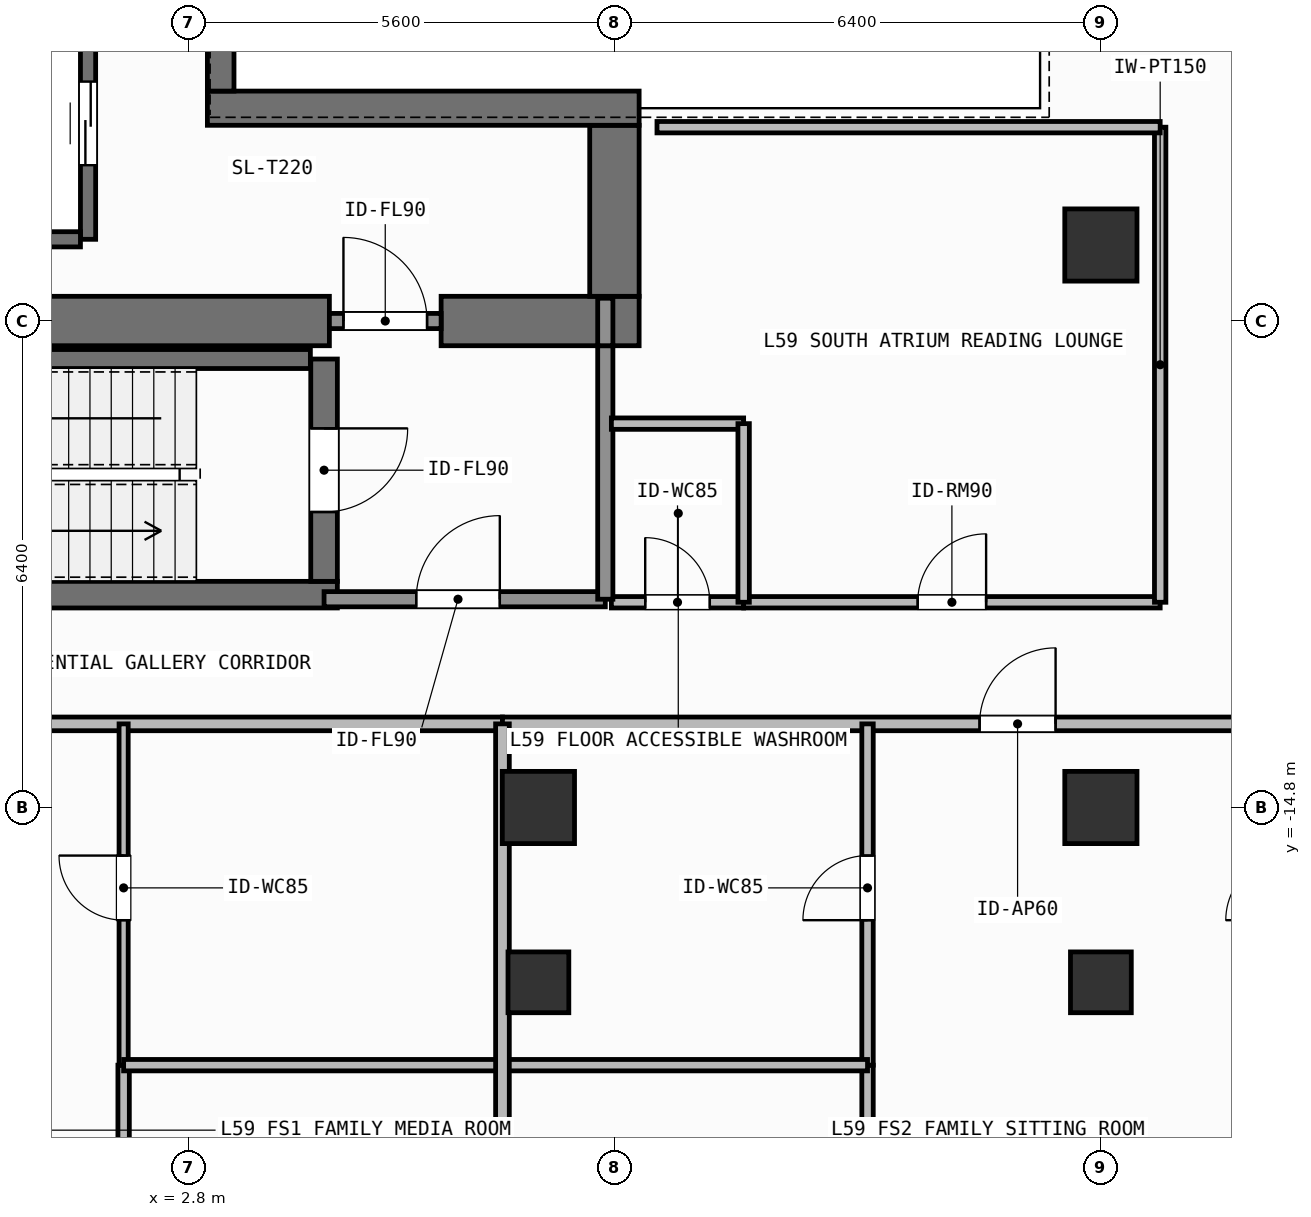
"""IFC4 building model, lengths in metres.
Left out: names, types, materials, properties, quantities, classifications, styles, units other than length and angle.
Written with IfcOpenShell. Run it as: python <this file> out.ifc"""

import sys

from ifc_helpers import new_model, si_unit, direction, frame, frame_2d, origin, origin_2d, place, context, subcontext, project, spatial, rectangle, hollow_rectangle, extrude, element, fill, save


model = new_model("IFC4")
c1 = context("Model", 3, precision=1e-05, world=origin(), true_north=direction((0.0, 1.0)))
c2 = subcontext(c1, "Body", "Model", "MODEL_VIEW")
j1 = project(units=[si_unit("LENGTHUNIT", "METRE"), si_unit("PLANEANGLEUNIT", "RADIAN")], contexts=[c1])
p1 = place(None, origin())
s1 = spatial("IfcSite", under=j1, at=p1, CompositionType="ELEMENT")
p2 = place(p1, origin())
s2 = spatial("IfcBuilding", under=s1, at=p2, CompositionType="ELEMENT")
p3 = place(p2, frame((0.0, 0.0, 243.0)))
s3 = spatial("IfcBuildingStorey", under=s2, at=p3, CompositionType="ELEMENT", Elevation=243.0)
p4 = place(p3, frame((-2.62, -8.4, 0.0), z_axis=(0.0, 0.0, 1.0), x_axis=(1.0, 0.0, 0.0)))
e1 = element("IfcWall", 1, at=p4, inside=s3, PredefinedType="SHEAR", context=c2, shape_type="SweptSolid", body=[
    extrude(rectangle(XDim=7.27, YDim=0.65, at=frame_2d((3.635, 0.0))), origin(), (0.0, 0.0, 1.0), 3.9),
])
p5 = place(p3, frame((6.12, -8.4, 0.0), z_axis=(0.0, 0.0, 1.0), x_axis=(1.0, 0.0, 0.0)))
e2 = element("IfcWall", 2, at=p5, inside=s3, PredefinedType="SHEAR", context=c2, shape_type="SweptSolid", body=[
    extrude(rectangle(XDim=2.605, YDim=0.65, at=frame_2d((1.302, 0.0))), origin(), (0.0, 0.0, 1.0), 3.9),
])
p6 = place(p3, frame((8.4, -8.075, 0.0), z_axis=(0.0, 0.0, 1.0), x_axis=(0.0, 1.0, 0.0)))
e3 = element("IfcWall", 3, at=p6, inside=s3, PredefinedType="SHEAR", context=c2, shape_type="SweptSolid", body=[
    extrude(rectangle(XDim=2.25, YDim=0.65, at=frame_2d((1.125, 0.0))), origin(), (0.0, 0.0, 1.0), 3.9),
])
p7 = place(p3, frame((3.045, -5.6, 0.0), z_axis=(0.0, 0.0, 1.0), x_axis=(1.0, 0.0, 0.0)))
e4 = element("IfcWall", 4, at=p7, inside=s3, PredefinedType="SHEAR", context=c2, shape_type="SweptSolid", body=[
    extrude(rectangle(XDim=5.68, YDim=0.45, at=frame_2d((2.84, 0.0))), origin(), (0.0, 0.0, 1.0), 3.9),
])
p8 = place(p3, frame((3.22, -5.375, 0.0), z_axis=(0.0, 0.0, 1.0), x_axis=(0.0, 1.0, 0.0)))
e5 = element("IfcWall", 5, at=p8, inside=s3, PredefinedType="SHEAR", context=c2, shape_type="SweptSolid", body=[
    extrude(rectangle(XDim=10.75, YDim=0.35, at=frame_2d((5.375, 0.0))), origin(), (0.0, 0.0, 1.0), 3.9),
])
p9 = place(p3, frame((-2.555, -12.0, 0.0), z_axis=(0.0, 0.0, 1.0), x_axis=(1.0, 0.0, 0.0)))
e6 = element("IfcWall", 6, at=p9, inside=s3, PredefinedType="SHEAR", context=c2, shape_type="SweptSolid", body=[
    extrude(rectangle(XDim=7.31, YDim=0.35, at=frame_2d((3.655, 0.0))), origin(), (0.0, 0.0, 1.0), 3.9),
])
p10 = place(p3, frame((-2.2, -8.9, 0.0), z_axis=(0.0, 0.0, 1.0), x_axis=(1.0, 0.0, 0.0)))
e7 = element("IfcWall", 7, at=p10, inside=s3, PredefinedType="SHEAR", context=c2, shape_type="SweptSolid", body=[
    extrude(rectangle(XDim=6.6, YDim=0.25, at=frame_2d((3.3, 0.0))), origin(), (0.0, 0.0, 1.0), 3.9),
])
p11 = place(p3, frame((4.58, -8.9, 0.0), z_axis=(0.0, 0.0, 1.0), x_axis=(0.0, -1.0, 0.0)))
e8 = element("IfcWall", 8, at=p11, inside=s3, PredefinedType="SHEAR", context=c2, shape_type="SweptSolid", body=[
    extrude(rectangle(XDim=2.925, YDim=0.35, at=frame_2d((1.462, 0.0))), origin(), (0.0, 0.0, 1.0), 3.9),
])
p12 = place(p11, frame((0.913, 0.0, 0.0)))
e9 = element("IfcOpeningElement", 9, at=p12, cuts=e8, PredefinedType="OPENING", context=c2, shape_type="SweptSolid", body=[
    extrude(rectangle(XDim=1.1, YDim=2.15, at=frame_2d((0.55, 1.075))), frame((0.0, 0.185, 0.0), z_axis=(0.0, -1.0, 0.0), x_axis=(1.0, 0.0, 0.0)), (0.0, 0.0, 1.0), 0.37),
])
for number, where, z_axis, x_axis in (
    (10, (7.4, -14.8, 0.0), (0.0, 0.0, 1.0), (1.0, 0.0, 0.0)),
    (11, (14.8, -14.8, 0.0), (0.0, 0.0, 1.0), (1.0, 0.0, 0.0)),
    (12, (14.8, -7.4, 0.0), (0.0, 0.0, 1.0), (1.0, 0.0, 0.0)),
):
    element("IfcColumn", number, at=place(p3, frame(where, z_axis=z_axis, x_axis=x_axis)), inside=s3, PredefinedType="COLUMN", context=c2, shape_type="SweptSolid", body=[
        extrude(rectangle(XDim=0.95, YDim=0.95, at=origin_2d()), origin(), (0.0, 0.0, 1.0), 3.9),
    ])
for number, where, z_axis, x_axis in (
    (13, (7.4, -17.1, 0.0), (0.0, 0.0, 1.0), (1.0, 0.0, 0.0)),
    (14, (14.8, -17.1, 0.0), (0.0, 0.0, 1.0), (1.0, 0.0, 0.0)),
):
    element("IfcColumn", number, at=place(p3, frame(where, z_axis=z_axis, x_axis=x_axis)), inside=s3, PredefinedType="COLUMN", context=c2, shape_type="SweptSolid", body=[
        extrude(hollow_rectangle(XDim=0.8, YDim=0.8, WallThickness=0.036, at=origin_2d()), origin(), (0.0, 0.0, 1.0), 3.9),
    ])
p13 = place(p3, frame((1.475, -7.325, 0.0), z_axis=(0.0, 0.0, 1.0), x_axis=(0.0, 1.0, 0.0)))
e15 = element("IfcWall", 15, at=p13, inside=s3, PredefinedType="SHEAR", context=c2, shape_type="SweptSolid", body=[
    extrude(rectangle(XDim=3.05, YDim=0.2, at=frame_2d((1.525, 0.0))), origin(), (0.0, 0.0, 1.0), 3.68),
])
p14 = place(p13, frame((0.975, 0.0, 0.0)))
e16 = element("IfcOpeningElement", 16, at=p14, cuts=e15, PredefinedType="OPENING", context=c2, shape_type="SweptSolid", body=[
    extrude(rectangle(XDim=1.1, YDim=2.2, at=frame_2d((0.55, 1.1))), frame((0.0, 0.11, 0.0), z_axis=(0.0, -1.0, 0.0), x_axis=(1.0, 0.0, 0.0)), (0.0, 0.0, 1.0), 0.22),
])
p15 = place(p3, frame((-0.975, -7.325, 0.0), z_axis=(0.0, 0.0, 1.0), x_axis=(1.0, 0.0, 0.0)))
e17 = element("IfcWall", 17, at=p15, inside=s3, PredefinedType="SHEAR", context=c2, shape_type="SweptSolid", body=[
    extrude(rectangle(XDim=2.35, YDim=0.2, at=frame_2d((1.175, 0.0))), origin(), (0.0, 0.0, 1.0), 3.68),
])
p16 = place(p3, frame((4.58, -12.06, 0.0), z_axis=(0.0, 0.0, 1.0), x_axis=(1.0, 0.0, 0.0)))
e18 = element("IfcWall", 18, at=p16, inside=s3, PredefinedType="SOLIDWALL", context=c2, shape_type="SweptSolid", body=[
    extrude(rectangle(XDim=3.7, YDim=0.2, at=frame_2d((1.85, 0.0))), origin(), (0.0, 0.0, 1.0), 3.68),
])
p17 = place(p16, frame((1.212, 0.0, 0.0)))
e19 = element("IfcOpeningElement", 19, at=p17, cuts=e18, PredefinedType="OPENING", context=c2, shape_type="SweptSolid", body=[
    extrude(rectangle(XDim=1.1, YDim=2.15, at=frame_2d((0.55, 1.075))), frame((0.0, 0.11, 0.0), z_axis=(0.0, -1.0, 0.0), x_axis=(1.0, 0.0, 0.0)), (0.0, 0.0, 1.0), 0.22),
])
p18 = place(p3, frame((4.65, -8.4, 0.0), z_axis=(0.0, 0.0, 1.0), x_axis=(1.0, 0.0, 0.0)))
e20 = element("IfcWall", 20, at=p18, inside=s3, PredefinedType="SOLIDWALL", context=c2, shape_type="SweptSolid", body=[
    extrude(rectangle(XDim=1.47, YDim=0.2, at=frame_2d((0.735, 0.0))), origin(), (0.0, 0.0, 1.0), 2.92),
])
p19 = place(p18, frame((0.185, 0.0, 0.0)))
e21 = element("IfcOpeningElement", 21, at=p19, cuts=e20, PredefinedType="OPENING", context=c2, shape_type="SweptSolid", body=[
    extrude(rectangle(XDim=1.1, YDim=2.15, at=frame_2d((0.55, 1.075))), frame((0.0, 0.11, 0.0), z_axis=(0.0, -1.0, 0.0), x_axis=(1.0, 0.0, 0.0)), (0.0, 0.0, 1.0), 0.22),
])
p20 = place(p3, frame((8.36, -12.1, 0.0), z_axis=(0.0, 0.0, 1.0), x_axis=(1.0, 0.0, 0.0)))
e22 = element("IfcWall", 22, at=p20, inside=s3, PredefinedType="PARTITIONING", context=c2, shape_type="SweptSolid", body=[
    extrude(rectangle(XDim=1.74, YDim=0.15, at=frame_2d((0.87, 0.0))), origin(), (0.0, 0.0, 1.0), 3.68),
])
p21 = place(p20, frame((0.445, 0.0, 0.0)))
e23 = element("IfcOpeningElement", 23, at=p21, cuts=e22, PredefinedType="OPENING", context=c2, shape_type="SweptSolid", body=[
    extrude(rectangle(XDim=0.85, YDim=2.1, at=frame_2d((0.425, 1.05))), frame((0.0, 0.085, 0.0), z_axis=(0.0, -1.0, 0.0), x_axis=(1.0, 0.0, 0.0)), (0.0, 0.0, 1.0), 0.17),
])
p22 = place(p3, frame((10.1, -12.1, 0.0), z_axis=(0.0, 0.0, 1.0), x_axis=(1.0, 0.0, 0.0)))
e24 = element("IfcWall", 24, at=p22, inside=s3, PredefinedType="PARTITIONING", context=c2, shape_type="SweptSolid", body=[
    extrude(rectangle(XDim=5.48, YDim=0.15, at=frame_2d((2.74, 0.0))), origin(), (0.0, 0.0, 1.0), 3.68),
])
p23 = place(p22, frame((2.29, 0.0, 0.0)))
e25 = element("IfcOpeningElement", 25, at=p23, cuts=e24, PredefinedType="OPENING", context=c2, shape_type="SweptSolid", body=[
    extrude(rectangle(XDim=0.9, YDim=2.1, at=frame_2d((0.45, 1.05))), frame((0.0, 0.085, 0.0), z_axis=(0.0, -1.0, 0.0), x_axis=(1.0, 0.0, 0.0)), (0.0, 0.0, 1.0), 0.17),
])
p24 = place(p3, frame((-15.02, -13.7, 0.0), z_axis=(0.0, 0.0, 1.0), x_axis=(1.0, 0.0, 0.0)))
e26 = element("IfcWall", 26, at=p24, inside=s3, PredefinedType="PARTITIONING", context=c2, shape_type="SweptSolid", body=[
    extrude(rectangle(XDim=21.947, YDim=0.18, at=frame_2d((10.974, 0.0))), origin(), (0.0, 0.0, 1.0), 3.68),
])
p25 = place(p24, frame((10.205, 0.0, 0.0)))
e27 = element("IfcOpeningElement", 27, at=p25, cuts=e26, PredefinedType="OPENING", context=c2, shape_type="SweptSolid", body=[
    extrude(rectangle(XDim=1.0, YDim=2.2, at=frame_2d((0.5, 1.1))), frame((0.0, 0.1, 0.0), z_axis=(0.0, -1.0, 0.0), x_axis=(1.0, 0.0, 0.0)), (0.0, 0.0, 1.0), 0.2),
])
p26 = place(p3, frame((1.943, -21.504, 0.0), z_axis=(0.0, 0.0, 1.0), x_axis=(0.0, 1.0, 0.0)))
e28 = element("IfcWall", 28, at=p26, inside=s3, PredefinedType="PARTITIONING", context=c2, shape_type="SweptSolid", body=[
    extrude(rectangle(XDim=3.314, YDim=0.15, at=frame_2d((1.657, 0.0))), origin(), (0.0, 0.0, 1.0), 3.68),
])
p27 = place(p26, frame((1.232, 0.0, 0.0)))
e29 = element("IfcOpeningElement", 29, at=p27, cuts=e28, PredefinedType="OPENING", context=c2, shape_type="SweptSolid", body=[
    extrude(rectangle(XDim=0.85, YDim=2.1, at=frame_2d((0.425, 1.05))), frame((0.0, 0.085, 0.0), z_axis=(0.0, -1.0, 0.0), x_axis=(1.0, 0.0, 0.0)), (0.0, 0.0, 1.0), 0.17),
])
p28 = place(p3, frame((1.943, -18.19, 0.0), z_axis=(0.0, 0.0, 1.0), x_axis=(0.0, 1.0, 0.0)))
e30 = element("IfcWall", 30, at=p28, inside=s3, PredefinedType="PARTITIONING", context=c2, shape_type="SweptSolid", body=[
    extrude(rectangle(XDim=4.49, YDim=0.12, at=frame_2d((2.245, 0.0))), origin(), (0.0, 0.0, 1.0), 3.68),
])
p29 = place(p28, frame((1.907, 0.0, 0.0)))
e31 = element("IfcOpeningElement", 31, at=p29, cuts=e30, PredefinedType="OPENING", context=c2, shape_type="SweptSolid", body=[
    extrude(rectangle(XDim=0.85, YDim=2.1, at=frame_2d((0.425, 1.05))), frame((0.0, 0.07, 0.0), z_axis=(0.0, -1.0, 0.0), x_axis=(1.0, 0.0, 0.0)), (0.0, 0.0, 1.0), 0.14),
])
p30 = place(p3, frame((6.927, -13.7, 0.0), z_axis=(0.0, 0.0, 1.0), x_axis=(1.0, 0.0, 0.0)))
e32 = element("IfcWall", 32, at=p30, inside=s3, PredefinedType="PARTITIONING", context=c2, shape_type="SweptSolid", body=[
    extrude(rectangle(XDim=15.893, YDim=0.18, at=frame_2d((7.947, 0.0))), origin(), (0.0, 0.0, 1.0), 3.68),
])
p31 = place(p30, frame((6.277, 0.0, 0.0)))
e33 = element("IfcOpeningElement", 33, at=p31, cuts=e32, PredefinedType="OPENING", context=c2, shape_type="SweptSolid", body=[
    extrude(rectangle(XDim=1.0, YDim=2.2, at=frame_2d((0.5, 1.1))), frame((0.0, 0.1, 0.0), z_axis=(0.0, -1.0, 0.0), x_axis=(1.0, 0.0, 0.0)), (0.0, 0.0, 1.0), 0.2),
])
p32 = place(p3, frame((11.73, -24.39, 0.0), z_axis=(0.0, 0.0, 1.0), x_axis=(0.0, 1.0, 0.0)))
e34 = element("IfcWall", 34, at=p32, inside=s3, PredefinedType="PARTITIONING", context=c2, shape_type="SweptSolid", body=[
    extrude(rectangle(XDim=6.2, YDim=0.15, at=frame_2d((3.1, 0.0))), origin(), (0.0, 0.0, 1.0), 3.68),
])
p33 = place(p32, frame((2.675, 0.0, 0.0)))
e35 = element("IfcOpeningElement", 35, at=p33, cuts=e34, PredefinedType="OPENING", context=c2, shape_type="SweptSolid", body=[
    extrude(rectangle(XDim=0.85, YDim=2.1, at=frame_2d((0.425, 1.05))), frame((0.0, 0.085, 0.0), z_axis=(0.0, -1.0, 0.0), x_axis=(1.0, 0.0, 0.0)), (0.0, 0.0, 1.0), 0.17),
])
p34 = place(p3, frame((11.73, -18.19, 0.0), z_axis=(0.0, 0.0, 1.0), x_axis=(0.0, 1.0, 0.0)))
e36 = element("IfcWall", 36, at=p34, inside=s3, PredefinedType="PARTITIONING", context=c2, shape_type="SweptSolid", body=[
    extrude(rectangle(XDim=4.49, YDim=0.15, at=frame_2d((2.245, 0.0))), origin(), (0.0, 0.0, 1.0), 3.68),
])
p35 = place(p34, frame((1.907, 0.0, 0.0)))
e37 = element("IfcOpeningElement", 37, at=p35, cuts=e36, PredefinedType="OPENING", context=c2, shape_type="SweptSolid", body=[
    extrude(rectangle(XDim=0.85, YDim=2.1, at=frame_2d((0.425, 1.05))), frame((0.0, 0.085, 0.0), z_axis=(0.0, -1.0, 0.0), x_axis=(1.0, 0.0, 0.0)), (0.0, 0.0, 1.0), 0.17),
])
p36 = place(p3, frame((8.28, -12.06, 0.0), z_axis=(0.0, 0.0, 1.0), x_axis=(0.0, 1.0, 0.0)))
e38 = element("IfcWall", 38, at=p36, inside=s3, PredefinedType="SOLIDWALL", context=c2, shape_type="SweptSolid", body=[
    extrude(rectangle(XDim=3.335, YDim=0.2, at=frame_2d((1.667, 0.0))), origin(), (0.0, 0.0, 1.0), 3.68),
])
p37 = place(p3, frame((8.28, -8.725, 0.0), z_axis=(0.0, 0.0, 1.0), x_axis=(0.0, 1.0, 0.0)))
e39 = element("IfcWall", 39, at=p37, inside=s3, PredefinedType="SOLIDWALL", context=c2, shape_type="SweptSolid", body=[
    extrude(rectangle(XDim=0.625, YDim=0.2, at=frame_2d((0.312, 0.0))), origin(), (0.0, 0.0, 1.0), 3.68),
])
p38 = place(p3, frame((8.36, -9.75, 0.0), z_axis=(0.0, 0.0, 1.0), x_axis=(1.0, 0.0, 0.0)))
e40 = element("IfcWall", 40, at=p38, inside=s3, PredefinedType="PARTITIONING", context=c2, shape_type="SweptSolid", body=[
    extrude(rectangle(XDim=1.74, YDim=0.15, at=frame_2d((0.87, 0.0))), origin(), (0.0, 0.0, 1.0), 3.68),
])
p39 = place(p3, frame((10.1, -12.1, 0.0), z_axis=(0.0, 0.0, 1.0), x_axis=(0.0, 1.0, 0.0)))
e41 = element("IfcWall", 41, at=p39, inside=s3, PredefinedType="PARTITIONING", context=c2, shape_type="SweptSolid", body=[
    extrude(rectangle(XDim=2.35, YDim=0.15, at=frame_2d((1.175, 0.0))), origin(), (0.0, 0.0, 1.0), 3.68),
])
p40 = place(p3, frame((15.58, -12.1, 0.0), z_axis=(0.0, 0.0, 1.0), x_axis=(0.0, 1.0, 0.0)))
e42 = element("IfcWall", 42, at=p40, inside=s3, PredefinedType="PARTITIONING", context=c2, shape_type="SweptSolid", body=[
    extrude(rectangle(XDim=6.25, YDim=0.15, at=frame_2d((3.125, 0.0))), origin(), (0.0, 0.0, 1.0), 3.68),
])
p41 = place(p3, frame((8.96, -5.85, 0.0), z_axis=(0.0, 0.0, 1.0), x_axis=(1.0, 0.0, 0.0)))
e43 = element("IfcWall", 43, at=p41, inside=s3, PredefinedType="PARTITIONING", context=c2, shape_type="SweptSolid", body=[
    extrude(rectangle(XDim=6.62, YDim=0.15, at=frame_2d((3.31, 0.0))), origin(), (0.0, 0.0, 1.0), 3.68),
])
p42 = place(p3, frame((1.943, -18.19, 0.0), z_axis=(0.0, 0.0, 1.0), x_axis=(1.0, 0.0, 0.0)))
e44 = element("IfcWall", 44, at=p42, inside=s3, PredefinedType="PARTITIONING", context=c2, shape_type="SweptSolid", body=[
    extrude(rectangle(XDim=4.984, YDim=0.15, at=frame_2d((2.492, 0.0))), origin(), (0.0, 0.0, 1.0), 3.68),
])
p43 = place(p3, frame((6.927, -18.19, 0.0), z_axis=(0.0, 0.0, 1.0), x_axis=(1.0, 0.0, 0.0)))
e45 = element("IfcWall", 45, at=p43, inside=s3, PredefinedType="PARTITIONING", context=c2, shape_type="SweptSolid", body=[
    extrude(rectangle(XDim=4.803, YDim=0.15, at=frame_2d((2.401, 0.0))), origin(), (0.0, 0.0, 1.0), 3.68),
])
p44 = place(p3, frame((6.927, -28.63, 0.0), z_axis=(0.0, 0.0, 1.0), x_axis=(0.0, 1.0, 0.0)))
e46 = element("IfcWall", 46, at=p44, inside=s3, PredefinedType="PARTITIONING", context=c2, shape_type="SweptSolid", body=[
    extrude(rectangle(XDim=14.93, YDim=0.18, at=frame_2d((7.465, 0.0))), origin(), (0.0, 0.0, 1.0), 3.68),
])
p45 = place(p14, origin())
e47 = element("IfcDoor", 47, at=p45, inside=s3, OperationType="SLIDING_TO_LEFT", PredefinedType="DOOR", context=c2, shape_type="SweptSolid", body=[
    extrude(rectangle(XDim=1.1, YDim=2.2, at=frame_2d((0.55, 1.1))), frame((0.0, 0.025, 0.0), z_axis=(0.0, -1.0, 0.0), x_axis=(1.0, 0.0, 0.0)), (0.0, 0.0, 1.0), 0.05),
])
fill(e16, e47)
p46 = place(p12, origin())
e48 = element("IfcDoor", 48, at=p46, inside=s3, OperationType="SINGLE_SWING_LEFT", PredefinedType="DOOR", context=c2, shape_type="SweptSolid", body=[
    extrude(rectangle(XDim=1.1, YDim=2.15, at=frame_2d((0.55, 1.075))), frame((0.0, 0.025, 0.0), z_axis=(0.0, -1.0, 0.0), x_axis=(1.0, 0.0, 0.0)), (0.0, 0.0, 1.0), 0.05),
])
fill(e9, e48)
p47 = place(p17, origin())
e49 = element("IfcDoor", 49, at=p47, inside=s3, OperationType="SINGLE_SWING_RIGHT", PredefinedType="DOOR", context=c2, shape_type="SweptSolid", body=[
    extrude(rectangle(XDim=1.1, YDim=2.15, at=frame_2d((0.55, 1.075))), frame((0.0, 0.025, 0.0), z_axis=(0.0, -1.0, 0.0), x_axis=(1.0, 0.0, 0.0)), (0.0, 0.0, 1.0), 0.05),
])
fill(e19, e49)
p48 = place(p19, origin())
e50 = element("IfcDoor", 50, at=p48, inside=s3, OperationType="SINGLE_SWING_LEFT", PredefinedType="DOOR", context=c2, shape_type="SweptSolid", body=[
    extrude(rectangle(XDim=1.1, YDim=2.15, at=frame_2d((0.55, 1.075))), frame((0.0, 0.025, 0.0), z_axis=(0.0, -1.0, 0.0), x_axis=(1.0, 0.0, 0.0)), (0.0, 0.0, 1.0), 0.05),
])
fill(e21, e50)
p49 = place(p21, origin())
e51 = element("IfcDoor", 51, at=p49, inside=s3, OperationType="SINGLE_SWING_LEFT", PredefinedType="DOOR", context=c2, shape_type="SweptSolid", body=[
    extrude(rectangle(XDim=0.85, YDim=2.1, at=frame_2d((0.425, 1.05))), frame((0.0, 0.025, 0.0), z_axis=(0.0, -1.0, 0.0), x_axis=(1.0, 0.0, 0.0)), (0.0, 0.0, 1.0), 0.05),
])
fill(e23, e51)
p50 = place(p23, origin())
e52 = element("IfcDoor", 52, at=p50, inside=s3, OperationType="SINGLE_SWING_RIGHT", PredefinedType="DOOR", context=c2, shape_type="SweptSolid", body=[
    extrude(rectangle(XDim=0.9, YDim=2.1, at=frame_2d((0.45, 1.05))), frame((0.0, 0.025, 0.0), z_axis=(0.0, -1.0, 0.0), x_axis=(1.0, 0.0, 0.0)), (0.0, 0.0, 1.0), 0.05),
])
fill(e25, e52)
p51 = place(p29, origin())
e53 = element("IfcDoor", 53, at=p51, inside=s3, OperationType="SINGLE_SWING_RIGHT", PredefinedType="DOOR", context=c2, shape_type="SweptSolid", body=[
    extrude(rectangle(XDim=0.85, YDim=2.1, at=frame_2d((0.425, 1.05))), frame((0.0, 0.025, 0.0), z_axis=(0.0, -1.0, 0.0), x_axis=(1.0, 0.0, 0.0)), (0.0, 0.0, 1.0), 0.05),
])
fill(e31, e53)
p52 = place(p31, origin())
e54 = element("IfcDoor", 54, at=p52, inside=s3, OperationType="SINGLE_SWING_RIGHT", PredefinedType="DOOR", context=c2, shape_type="SweptSolid", body=[
    extrude(rectangle(XDim=1.0, YDim=2.2, at=frame_2d((0.5, 1.1))), frame((0.0, 0.025, 0.0), z_axis=(0.0, -1.0, 0.0), x_axis=(1.0, 0.0, 0.0)), (0.0, 0.0, 1.0), 0.05),
])
fill(e33, e54)
p53 = place(p35, origin())
e55 = element("IfcDoor", 55, at=p53, inside=s3, OperationType="SINGLE_SWING_LEFT", PredefinedType="DOOR", context=c2, shape_type="SweptSolid", body=[
    extrude(rectangle(XDim=0.85, YDim=2.1, at=frame_2d((0.425, 1.05))), frame((0.0, 0.025, 0.0), z_axis=(0.0, -1.0, 0.0), x_axis=(1.0, 0.0, 0.0)), (0.0, 0.0, 1.0), 0.05),
])
fill(e37, e55)
save(model, sys.argv[1])
